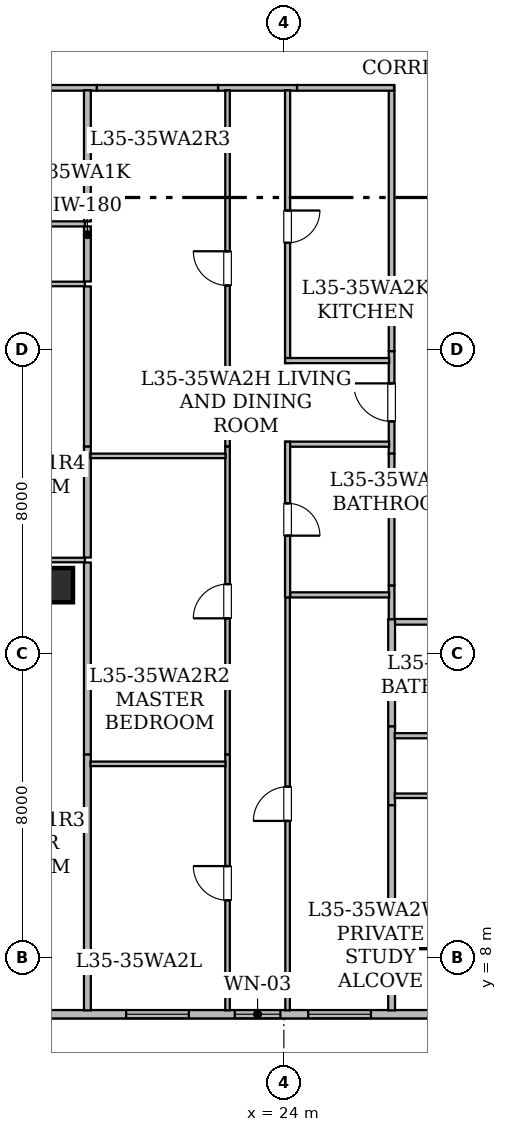
"""IFC4 building model, lengths in metres.
Left out: names, types, materials, properties, quantities, classifications, styles, units other than length and angle.
Written with IfcOpenShell. Run it as: python <this file> out.ifc"""

import sys

from ifc_helpers import new_model, si_unit, direction, frame, frame_2d, origin, origin_2d, place, context, subcontext, project, spatial, rectangle, hollow_rectangle, extrude, element, fill, save


model = new_model("IFC4")
c1 = context("Model", 3, precision=1e-05, world=origin(), true_north=direction((0.0, 1.0)))
c2 = subcontext(c1, "Body", "Model", "MODEL_VIEW")
j1 = project(units=[si_unit("LENGTHUNIT", "METRE"), si_unit("PLANEANGLEUNIT", "RADIAN")], contexts=[c1])
p1 = place(None, origin())
s1 = spatial("IfcSite", under=j1, at=p1, CompositionType="ELEMENT")
p2 = place(p1, origin())
s2 = spatial("IfcBuilding", under=s1, at=p2, CompositionType="ELEMENT")
p3 = place(p2, frame((0.0, 0.0, 138.4)))
s3 = spatial("IfcBuildingStorey", under=s2, at=p3, CompositionType="ELEMENT", Elevation=138.4)
for number, where, z_axis, x_axis in (
    (1, (27.35, 8.7, 0.0), (0.0, 0.0, 1.0), (1.0, 0.0, 0.0)),
    (2, (18.0, 17.8, 0.0), (0.0, 0.0, 1.0), (1.0, 0.0, 0.0)),
):
    element("IfcColumn", number, at=place(p3, frame(where, z_axis=z_axis, x_axis=x_axis)), inside=s3, PredefinedType="COLUMN", context=c2, shape_type="SweptSolid", body=[
        extrude(hollow_rectangle(XDim=0.9, YDim=0.9, WallThickness=0.045, at=origin_2d()), origin(), (0.0, 0.0, 1.0), 3.65),
    ])
p4 = place(p3, frame((52.283, 6.51, 0.0), z_axis=(0.0, 0.0, 1.0), x_axis=(-1.0, 0.0, 0.0)))
e3 = element("IfcWall", 3, at=p4, inside=s3, PredefinedType="STANDARD", context=c2, shape_type="SweptSolid", body=[
    extrude(rectangle(XDim=38.568, YDim=0.22, at=frame_2d((19.284, 0.0))), origin(), (0.0, 0.0, 1.0), 3.43),
])
p5 = place(p4, frame((34.581, 0.0, 0.85)))
e4 = element("IfcOpeningElement", 4, at=p5, cuts=e3, PredefinedType="OPENING", context=c2, shape_type="SweptSolid", body=[
    extrude(rectangle(XDim=1.65, YDim=1.55, at=frame_2d((0.825, 0.775))), frame((0.0, 0.12, 0.0), z_axis=(0.0, -1.0, 0.0), x_axis=(1.0, 0.0, 0.0)), (0.0, 0.0, 1.0), 0.24),
])
p6 = place(p4, frame((25.992, 0.0, 0.85)))
e5 = element("IfcOpeningElement", 5, at=p6, cuts=e3, PredefinedType="OPENING", context=c2, shape_type="SweptSolid", body=[
    extrude(rectangle(XDim=1.65, YDim=1.55, at=frame_2d((0.825, 0.775))), frame((0.0, 0.12, 0.0), z_axis=(0.0, -1.0, 0.0), x_axis=(1.0, 0.0, 0.0)), (0.0, 0.0, 1.0), 0.24),
])
p7 = place(p4, frame((28.375, 0.0, 0.8)))
e6 = element("IfcOpeningElement", 6, at=p7, cuts=e3, PredefinedType="OPENING", context=c2, shape_type="SweptSolid", body=[
    extrude(rectangle(XDim=1.2, YDim=1.5, at=frame_2d((0.6, 0.75))), frame((0.0, 0.12, 0.0), z_axis=(0.0, -1.0, 0.0), x_axis=(1.0, 0.0, 0.0)), (0.0, 0.0, 1.0), 0.24),
])
p8 = place(p4, frame((30.784, 0.0, 0.85)))
e7 = element("IfcOpeningElement", 7, at=p8, cuts=e3, PredefinedType="OPENING", context=c2, shape_type="SweptSolid", body=[
    extrude(rectangle(XDim=1.65, YDim=1.55, at=frame_2d((0.825, 0.775))), frame((0.0, 0.12, 0.0), z_axis=(0.0, -1.0, 0.0), x_axis=(1.0, 0.0, 0.0)), (0.0, 0.0, 1.0), 0.24),
])
p9 = place(p4, frame((21.298, 0.0, 0.85)))
e8 = element("IfcOpeningElement", 8, at=p9, cuts=e3, PredefinedType="OPENING", context=c2, shape_type="SweptSolid", body=[
    extrude(rectangle(XDim=1.65, YDim=1.55, at=frame_2d((0.825, 0.775))), frame((0.0, 0.12, 0.0), z_axis=(0.0, -1.0, 0.0), x_axis=(1.0, 0.0, 0.0)), (0.0, 0.0, 1.0), 0.24),
])
p10 = place(p4, frame((14.033, 0.0, 0.85)))
e9 = element("IfcOpeningElement", 9, at=p10, cuts=e3, PredefinedType="OPENING", context=c2, shape_type="SweptSolid", body=[
    extrude(rectangle(XDim=1.65, YDim=1.55, at=frame_2d((0.825, 0.775))), frame((0.0, 0.12, 0.0), z_axis=(0.0, -1.0, 0.0), x_axis=(1.0, 0.0, 0.0)), (0.0, 0.0, 1.0), 0.24),
])
p11 = place(p4, frame((6.688, 0.0, 0.85)))
e10 = element("IfcOpeningElement", 10, at=p11, cuts=e3, PredefinedType="OPENING", context=c2, shape_type="SweptSolid", body=[
    extrude(rectangle(XDim=1.65, YDim=1.55, at=frame_2d((0.825, 0.775))), frame((0.0, 0.12, 0.0), z_axis=(0.0, -1.0, 0.0), x_axis=(1.0, 0.0, 0.0)), (0.0, 0.0, 1.0), 0.24),
])
p12 = place(p4, frame((0.587, 0.0, 0.85)))
e11 = element("IfcOpeningElement", 11, at=p12, cuts=e3, PredefinedType="OPENING", context=c2, shape_type="SweptSolid", body=[
    extrude(rectangle(XDim=1.65, YDim=1.55, at=frame_2d((0.825, 0.775))), frame((0.0, 0.12, 0.0), z_axis=(0.0, -1.0, 0.0), x_axis=(1.0, 0.0, 0.0)), (0.0, 0.0, 1.0), 0.24),
])
p13 = place(p3, frame((19.08, 30.885, 0.0), z_axis=(0.0, 0.0, 1.0), x_axis=(-1.0, 0.0, 0.0)))
e12 = element("IfcWall", 12, at=p13, inside=s3, PredefinedType="STANDARD", context=c2, shape_type="SweptSolid", body=[
    extrude(rectangle(XDim=3.437, YDim=0.15, at=frame_2d((1.719, 0.0))), origin(), (0.0, 0.0, 1.0), 2.647),
])
p14 = place(p3, frame((26.835, 16.9, 0.0), z_axis=(0.0, 0.0, 1.0), x_axis=(0.0, 1.0, 0.0)))
e13 = element("IfcWall", 13, at=p14, inside=s3, PredefinedType="STANDARD", context=c2, shape_type="SweptSolid", body=[
    extrude(rectangle(XDim=0.893, YDim=0.15, at=frame_2d((0.447, 0.0))), origin(), (0.0, 0.0, 1.0), 3.43),
])
p15 = place(p3, frame((26.835, 21.26, 0.0), z_axis=(0.0, 0.0, 1.0), x_axis=(0.0, 1.0, 0.0)))
e14 = element("IfcWall", 14, at=p15, inside=s3, PredefinedType="STANDARD", context=c2, shape_type="SweptSolid", body=[
    extrude(rectangle(XDim=2.698, YDim=0.15, at=frame_2d((1.349, 0.0))), origin(), (0.0, 0.0, 1.0), 3.43),
])
p16 = place(p15, frame((0.849, 0.0, 0.0)))
e15 = element("IfcOpeningElement", 15, at=p16, cuts=e14, PredefinedType="OPENING", context=c2, shape_type="SweptSolid", body=[
    extrude(rectangle(XDim=1.0, YDim=2.15, at=frame_2d((0.5, 1.075))), frame((0.0, 0.085, 0.0), z_axis=(0.0, -1.0, 0.0), x_axis=(1.0, 0.0, 0.0)), (0.0, 0.0, 1.0), 0.17),
])
p17 = place(p3, frame((24.347, 30.885, 0.0), z_axis=(0.0, 0.0, 1.0), x_axis=(-1.0, 0.0, 0.0)))
e16 = element("IfcWall", 16, at=p17, inside=s3, PredefinedType="STANDARD", context=c2, shape_type="SweptSolid", body=[
    extrude(rectangle(XDim=2.079, YDim=0.15, at=frame_2d((1.04, 0.0))), origin(), (0.0, 0.0, 1.0), 3.43),
])
p18 = place(p3, frame((26.835, 17.793, 0.0), z_axis=(0.0, 0.0, 1.0), x_axis=(0.0, 1.0, 0.0)))
e17 = element("IfcWall", 17, at=p18, inside=s3, PredefinedType="STANDARD", context=c2, shape_type="SweptSolid", body=[
    extrude(rectangle(XDim=3.467, YDim=0.15, at=frame_2d((1.733, 0.0))), origin(), (0.0, 0.0, 1.0), 2.647),
])
p19 = place(p3, frame((26.835, 23.958, 0.0), z_axis=(0.0, 0.0, 1.0), x_axis=(0.0, 1.0, 0.0)))
e18 = element("IfcWall", 18, at=p19, inside=s3, PredefinedType="STANDARD", context=c2, shape_type="SweptSolid", body=[
    extrude(rectangle(XDim=6.992, YDim=0.15, at=frame_2d((3.496, 0.0))), origin(), (0.0, 0.0, 1.0), 3.013),
])
p20 = place(p3, frame((26.898, 30.885, 0.0), z_axis=(0.0, 0.0, 1.0), x_axis=(-1.0, 0.0, 0.0)))
e19 = element("IfcWall", 19, at=p20, inside=s3, PredefinedType="STANDARD", context=c2, shape_type="SweptSolid", body=[
    extrude(rectangle(XDim=2.551, YDim=0.15, at=frame_2d((1.275, 0.0))), origin(), (0.0, 0.0, 1.0), 3.43),
])
p21 = place(p3, frame((22.268, 30.885, 0.0), z_axis=(0.0, 0.0, 1.0), x_axis=(-1.0, 0.0, 0.0)))
e20 = element("IfcWall", 20, at=p21, inside=s3, PredefinedType="STANDARD", context=c2, shape_type="SweptSolid", body=[
    extrude(rectangle(XDim=3.188, YDim=0.15, at=frame_2d((1.594, 0.0))), origin(), (0.0, 0.0, 1.0), 3.43),
])
p22 = place(p3, frame((31.601, 16.835, 0.0), z_axis=(0.0, 0.0, 1.0), x_axis=(-1.0, 0.0, 0.0)))
e21 = element("IfcWall", 21, at=p22, inside=s3, PredefinedType="STANDARD", context=c2, shape_type="SweptSolid", body=[
    extrude(rectangle(XDim=4.701, YDim=0.15, at=frame_2d((2.351, 0.0))), origin(), (0.0, 0.0, 1.0), 2.647),
])
p23 = place(p3, frame((15.859, 27.305, 0.0), z_axis=(0.0, 0.0, 1.0), x_axis=(1.0, 0.0, 0.0)))
e22 = element("IfcWall", 22, at=p23, inside=s3, PredefinedType="PARTITIONING", context=c2, shape_type="SweptSolid", body=[
    extrude(rectangle(XDim=2.906, YDim=0.135, at=frame_2d((1.453, 0.0))), origin(), (0.0, 0.0, 1.0), 2.647),
])
p24 = place(p3, frame((18.765, 25.725, 0.0), z_axis=(0.0, 0.0, 1.0), x_axis=(-1.0, 0.0, 0.0)))
e23 = element("IfcWall", 23, at=p24, inside=s3, PredefinedType="PARTITIONING", context=c2, shape_type="SweptSolid", body=[
    extrude(rectangle(XDim=3.907, YDim=0.12, at=frame_2d((1.954, 0.0))), origin(), (0.0, 0.0, 1.0), 2.647),
])
p25 = place(p3, frame((18.83, 27.24, 0.0), z_axis=(0.0, 0.0, 1.0), x_axis=(0.0, -1.0, 0.0)))
e24 = element("IfcWall", 24, at=p25, inside=s3, PredefinedType="STANDARD", context=c2, shape_type="SweptSolid", body=[
    extrude(rectangle(XDim=1.45, YDim=0.18, at=frame_2d((0.725, 0.0))), origin(), (0.0, 0.0, 1.0), 3.43),
])
p26 = place(p3, frame((18.83, 30.82, 0.0), z_axis=(0.0, 0.0, 1.0), x_axis=(0.0, -1.0, 0.0)))
e25 = element("IfcWall", 25, at=p26, inside=s3, PredefinedType="STANDARD", context=c2, shape_type="SweptSolid", body=[
    extrude(rectangle(XDim=3.45, YDim=0.18, at=frame_2d((1.725, 0.0))), origin(), (0.0, 0.0, 1.0), 3.013),
])
p27 = place(p3, frame((14.977, 18.461, 0.0), z_axis=(0.0, 0.0, 1.0), x_axis=(1.0, 0.0, 0.0)))
e26 = element("IfcWall", 26, at=p27, inside=s3, PredefinedType="PARTITIONING", context=c2, shape_type="SweptSolid", body=[
    extrude(rectangle(XDim=3.788, YDim=0.12, at=frame_2d((1.894, 0.0))), origin(), (0.0, 0.0, 1.0), 2.647),
])
p28 = place(p3, frame((18.83, 13.347, 0.0), z_axis=(0.0, 0.0, 1.0), x_axis=(0.0, -1.0, 0.0)))
e27 = element("IfcWall", 27, at=p28, inside=s3, PredefinedType="STANDARD", context=c2, shape_type="SweptSolid", body=[
    extrude(rectangle(XDim=6.735, YDim=0.18, at=frame_2d((3.367, 0.0))), origin(), (0.0, 0.0, 1.0), 2.876),
])
p29 = place(p3, frame((18.83, 18.396, 0.0), z_axis=(0.0, 0.0, 1.0), x_axis=(0.0, -1.0, 0.0)))
e28 = element("IfcWall", 28, at=p29, inside=s3, PredefinedType="STANDARD", context=c2, shape_type="SweptSolid", body=[
    extrude(rectangle(XDim=5.049, YDim=0.18, at=frame_2d((2.524, 0.0))), origin(), (0.0, 0.0, 1.0), 2.647),
])
p30 = place(p3, frame((18.83, 21.451, 0.0), z_axis=(0.0, 0.0, 1.0), x_axis=(0.0, -1.0, 0.0)))
e29 = element("IfcWall", 29, at=p30, inside=s3, PredefinedType="STANDARD", context=c2, shape_type="SweptSolid", body=[
    extrude(rectangle(XDim=2.925, YDim=0.18, at=frame_2d((1.462, 0.0))), origin(), (0.0, 0.0, 1.0), 3.43),
])
p31 = place(p3, frame((18.83, 25.66, 0.0), z_axis=(0.0, 0.0, 1.0), x_axis=(0.0, -1.0, 0.0)))
e30 = element("IfcWall", 30, at=p31, inside=s3, PredefinedType="STANDARD", context=c2, shape_type="SweptSolid", body=[
    extrude(rectangle(XDim=4.209, YDim=0.18, at=frame_2d((2.104, 0.0))), origin(), (0.0, 0.0, 1.0), 3.43),
])
p32 = place(p3, frame((24.098, 6.612, 0.0), z_axis=(0.0, 0.0, 1.0), x_axis=(0.0, 1.0, 0.0)))
e31 = element("IfcWall", 31, at=p32, inside=s3, PredefinedType="PARTITIONING", context=c2, shape_type="SweptSolid", body=[
    extrude(rectangle(XDim=10.867, YDim=0.12, at=frame_2d((5.434, 0.0))), origin(), (0.0, 0.0, 1.0), 2.876),
])
p33 = place(p32, frame((4.984, 0.0, 0.0)))
e32 = element("IfcOpeningElement", 32, at=p33, cuts=e31, PredefinedType="OPENING", context=c2, shape_type="SweptSolid", body=[
    extrude(rectangle(XDim=0.9, YDim=2.1, at=frame_2d((0.45, 1.05))), frame((0.0, 0.07, 0.0), z_axis=(0.0, -1.0, 0.0), x_axis=(1.0, 0.0, 0.0)), (0.0, 0.0, 1.0), 0.14),
])
p34 = place(p3, frame((24.163, 17.544, 0.0), z_axis=(0.0, 0.0, 1.0), x_axis=(1.0, 0.0, 0.0)))
e33 = element("IfcWall", 33, at=p34, inside=s3, PredefinedType="PARTITIONING", context=c2, shape_type="SweptSolid", body=[
    extrude(rectangle(XDim=2.607, YDim=0.135, at=frame_2d((1.303, 0.0))), origin(), (0.0, 0.0, 1.0), 3.43),
])
p35 = place(p3, frame((26.835, 14.087, 0.0), z_axis=(0.0, 0.0, 1.0), x_axis=(0.0, -1.0, 0.0)))
e34 = element("IfcWall", 34, at=p35, inside=s3, PredefinedType="STANDARD", context=c2, shape_type="SweptSolid", body=[
    extrude(rectangle(XDim=2.078, YDim=0.18, at=frame_2d((1.039, 0.0))), origin(), (0.0, 0.0, 1.0), 3.43),
])
p36 = place(p3, frame((26.835, 16.9, 0.0), z_axis=(0.0, 0.0, 1.0), x_axis=(0.0, -1.0, 0.0)))
e35 = element("IfcWall", 35, at=p36, inside=s3, PredefinedType="STANDARD", context=c2, shape_type="SweptSolid", body=[
    extrude(rectangle(XDim=2.813, YDim=0.18, at=frame_2d((1.406, 0.0))), origin(), (0.0, 0.0, 1.0), 3.43),
])
p37 = place(p3, frame((26.835, 12.009, 0.0), z_axis=(0.0, 0.0, 1.0), x_axis=(0.0, -1.0, 0.0)))
e36 = element("IfcWall", 36, at=p37, inside=s3, PredefinedType="STANDARD", context=c2, shape_type="SweptSolid", body=[
    extrude(rectangle(XDim=5.397, YDim=0.18, at=frame_2d((2.698, 0.0))), origin(), (0.0, 0.0, 1.0), 2.876),
])
p38 = place(p3, frame((26.77, 21.509, 0.0), z_axis=(0.0, 0.0, 1.0), x_axis=(-1.0, 0.0, 0.0)))
e37 = element("IfcWall", 37, at=p38, inside=s3, PredefinedType="PARTITIONING", context=c2, shape_type="SweptSolid", body=[
    extrude(rectangle(XDim=2.737, YDim=0.135, at=frame_2d((1.369, 0.0))), origin(), (0.0, 0.0, 1.0), 3.43),
])
p39 = place(p3, frame((24.098, 21.574, 0.0), z_axis=(0.0, 0.0, 1.0), x_axis=(0.0, -1.0, 0.0)))
e38 = element("IfcWall", 38, at=p39, inside=s3, PredefinedType="PARTITIONING", context=c2, shape_type="SweptSolid", body=[
    extrude(rectangle(XDim=4.095, YDim=0.135, at=frame_2d((2.047, 0.0))), origin(), (0.0, 0.0, 1.0), 2.647),
])
p40 = place(p39, frame((1.622, 0.0, 0.0)))
e39 = element("IfcOpeningElement", 39, at=p40, cuts=e38, PredefinedType="OPENING", context=c2, shape_type="SweptSolid", body=[
    extrude(rectangle(XDim=0.85, YDim=2.1, at=frame_2d((0.425, 1.05))), frame((0.0, 0.077, 0.0), z_axis=(0.0, -1.0, 0.0), x_axis=(1.0, 0.0, 0.0)), (0.0, 0.0, 1.0), 0.155),
])
p41 = place(p3, frame((24.098, 30.82, 0.0), z_axis=(0.0, 0.0, 1.0), x_axis=(0.0, -1.0, 0.0)))
e40 = element("IfcWall", 40, at=p41, inside=s3, PredefinedType="PARTITIONING", context=c2, shape_type="SweptSolid", body=[
    extrude(rectangle(XDim=7.176, YDim=0.135, at=frame_2d((3.588, 0.0))), origin(), (0.0, 0.0, 1.0), 3.013),
])
p42 = place(p41, frame((3.163, 0.0, 0.0)))
e41 = element("IfcOpeningElement", 41, at=p42, cuts=e40, PredefinedType="OPENING", context=c2, shape_type="SweptSolid", body=[
    extrude(rectangle(XDim=0.85, YDim=2.1, at=frame_2d((0.425, 1.05))), frame((0.0, 0.077, 0.0), z_axis=(0.0, -1.0, 0.0), x_axis=(1.0, 0.0, 0.0)), (0.0, 0.0, 1.0), 0.155),
])
p43 = place(p3, frame((24.033, 23.709, 0.0), z_axis=(0.0, 0.0, 1.0), x_axis=(1.0, 0.0, 0.0)))
e42 = element("IfcWall", 42, at=p43, inside=s3, PredefinedType="PARTITIONING", context=c2, shape_type="SweptSolid", body=[
    extrude(rectangle(XDim=2.737, YDim=0.135, at=frame_2d((1.369, 0.0))), origin(), (0.0, 0.0, 1.0), 3.43),
])
p44 = place(p3, frame((22.518, 6.612, 0.0), z_axis=(0.0, 0.0, 1.0), x_axis=(0.0, 1.0, 0.0)))
e43 = element("IfcWall", 43, at=p44, inside=s3, PredefinedType="PARTITIONING", context=c2, shape_type="SweptSolid", body=[
    extrude(rectangle(XDim=6.735, YDim=0.12, at=frame_2d((3.367, 0.0))), origin(), (0.0, 0.0, 1.0), 2.876),
])
p45 = place(p44, frame((2.896, 0.0, 0.0)))
e44 = element("IfcOpeningElement", 44, at=p45, cuts=e43, PredefinedType="OPENING", context=c2, shape_type="SweptSolid", body=[
    extrude(rectangle(XDim=0.9, YDim=2.1, at=frame_2d((0.45, 1.05))), frame((0.0, 0.07, 0.0), z_axis=(0.0, -1.0, 0.0), x_axis=(1.0, 0.0, 0.0)), (0.0, 0.0, 1.0), 0.14),
])
p46 = place(p3, frame((22.518, 13.347, 0.0), z_axis=(0.0, 0.0, 1.0), x_axis=(0.0, 1.0, 0.0)))
e45 = element("IfcWall", 45, at=p46, inside=s3, PredefinedType="PARTITIONING", context=c2, shape_type="SweptSolid", body=[
    extrude(rectangle(XDim=8.104, YDim=0.12, at=frame_2d((4.052, 0.0))), origin(), (0.0, 0.0, 1.0), 2.647),
])
p47 = place(p46, frame((3.58, 0.0, 0.0)))
e46 = element("IfcOpeningElement", 46, at=p47, cuts=e45, PredefinedType="OPENING", context=c2, shape_type="SweptSolid", body=[
    extrude(rectangle(XDim=0.9, YDim=2.1, at=frame_2d((0.45, 1.05))), frame((0.0, 0.07, 0.0), z_axis=(0.0, -1.0, 0.0), x_axis=(1.0, 0.0, 0.0)), (0.0, 0.0, 1.0), 0.14),
])
p48 = place(p3, frame((22.518, 21.451, 0.0), z_axis=(0.0, 0.0, 1.0), x_axis=(0.0, 1.0, 0.0)))
e47 = element("IfcWall", 47, at=p48, inside=s3, PredefinedType="PARTITIONING", context=c2, shape_type="SweptSolid", body=[
    extrude(rectangle(XDim=9.369, YDim=0.12, at=frame_2d((4.685, 0.0))), origin(), (0.0, 0.0, 1.0), 3.013),
])
p49 = place(p48, frame((4.234, 0.0, 0.0)))
e48 = element("IfcOpeningElement", 48, at=p49, cuts=e47, PredefinedType="OPENING", context=c2, shape_type="SweptSolid", body=[
    extrude(rectangle(XDim=0.9, YDim=2.1, at=frame_2d((0.45, 1.05))), frame((0.0, 0.07, 0.0), z_axis=(0.0, -1.0, 0.0), x_axis=(1.0, 0.0, 0.0)), (0.0, 0.0, 1.0), 0.14),
])
for number, where, z_axis, x_axis in (
    (49, (18.912, 13.098, 0.0), (0.0, 0.0, 1.0), (1.0, 0.0, 0.0)),
    (50, (18.912, 21.201, 0.0), (0.0, 0.0, 1.0), (1.0, 0.0, 0.0)),
):
    element("IfcWall", number, at=place(p3, frame(where, z_axis=z_axis, x_axis=x_axis)), inside=s3, PredefinedType="PARTITIONING", context=c2, shape_type="SweptSolid", body=[
        extrude(rectangle(XDim=3.552, YDim=0.12, at=frame_2d((1.776, 0.0))), origin(), (0.0, 0.0, 1.0), 3.43),
    ])
p50 = place(p3, frame((26.917, 13.838, 0.0), z_axis=(0.0, 0.0, 1.0), x_axis=(1.0, 0.0, 0.0)))
e51 = element("IfcWall", 51, at=p50, inside=s3, PredefinedType="PARTITIONING", context=c2, shape_type="SweptSolid", body=[
    extrude(rectangle(XDim=4.998, YDim=0.135, at=frame_2d((2.499, 0.0))), origin(), (0.0, 0.0, 1.0), 2.647),
])
p51 = place(p50, frame((2.074, 0.0, 0.0)))
e52 = element("IfcOpeningElement", 52, at=p51, cuts=e51, PredefinedType="OPENING", context=c2, shape_type="SweptSolid", body=[
    extrude(rectangle(XDim=0.85, YDim=2.1, at=frame_2d((0.425, 1.05))), frame((0.0, 0.077, 0.0), z_axis=(0.0, -1.0, 0.0), x_axis=(1.0, 0.0, 0.0)), (0.0, 0.0, 1.0), 0.155),
])
p52 = place(p3, frame((33.734, 12.258, 0.0), z_axis=(0.0, 0.0, 1.0), x_axis=(-1.0, 0.0, 0.0)))
e53 = element("IfcWall", 53, at=p52, inside=s3, PredefinedType="PARTITIONING", context=c2, shape_type="SweptSolid", body=[
    extrude(rectangle(XDim=6.817, YDim=0.12, at=frame_2d((3.408, 0.0))), origin(), (0.0, 0.0, 1.0), 2.647),
])
p53 = place(p52, frame((2.98, 0.0, 0.0)))
e54 = element("IfcOpeningElement", 54, at=p53, cuts=e53, PredefinedType="OPENING", context=c2, shape_type="SweptSolid", body=[
    extrude(rectangle(XDim=0.9, YDim=2.1, at=frame_2d((0.45, 1.05))), frame((0.0, 0.07, 0.0), z_axis=(0.0, -1.0, 0.0), x_axis=(1.0, 0.0, 0.0)), (0.0, 0.0, 1.0), 0.14),
])
p54 = place(p6, origin())
e55 = element("IfcWindow", 55, at=p54, inside=s3, PartitioningType="SINGLE_PANEL", PredefinedType="WINDOW", context=c2, shape_type="SweptSolid", body=[
    extrude(rectangle(XDim=1.65, YDim=1.55, at=frame_2d((0.825, 0.775))), frame((0.0, 0.03, 0.0), z_axis=(0.0, -1.0, 0.0), x_axis=(1.0, 0.0, 0.0)), (0.0, 0.0, 1.0), 0.06),
])
fill(e5, e55)
p55 = place(p7, origin())
e56 = element("IfcWindow", 56, at=p55, inside=s3, PartitioningType="SINGLE_PANEL", PredefinedType="WINDOW", context=c2, shape_type="SweptSolid", body=[
    extrude(rectangle(XDim=1.2, YDim=1.5, at=frame_2d((0.6, 0.75))), frame((0.0, 0.03, 0.0), z_axis=(0.0, -1.0, 0.0), x_axis=(1.0, 0.0, 0.0)), (0.0, 0.0, 1.0), 0.06),
])
fill(e6, e56)
p56 = place(p8, origin())
e57 = element("IfcWindow", 57, at=p56, inside=s3, PartitioningType="SINGLE_PANEL", PredefinedType="WINDOW", context=c2, shape_type="SweptSolid", body=[
    extrude(rectangle(XDim=1.65, YDim=1.55, at=frame_2d((0.825, 0.775))), frame((0.0, 0.03, 0.0), z_axis=(0.0, -1.0, 0.0), x_axis=(1.0, 0.0, 0.0)), (0.0, 0.0, 1.0), 0.06),
])
fill(e7, e57)
p57 = place(p16, origin())
e58 = element("IfcDoor", 58, at=p57, inside=s3, OperationType="SINGLE_SWING_RIGHT", PredefinedType="DOOR", context=c2, shape_type="SweptSolid", body=[
    extrude(rectangle(XDim=1.0, YDim=2.15, at=frame_2d((0.5, 1.075))), frame((0.0, 0.025, 0.0), z_axis=(0.0, -1.0, 0.0), x_axis=(1.0, 0.0, 0.0)), (0.0, 0.0, 1.0), 0.05),
])
fill(e15, e58)
p58 = place(p33, origin())
e59 = element("IfcDoor", 59, at=p58, inside=s3, OperationType="SINGLE_SWING_LEFT", PredefinedType="DOOR", context=c2, shape_type="SweptSolid", body=[
    extrude(rectangle(XDim=0.9, YDim=2.1, at=frame_2d((0.45, 1.05))), frame((0.0, 0.025, 0.0), z_axis=(0.0, -1.0, 0.0), x_axis=(1.0, 0.0, 0.0)), (0.0, 0.0, 1.0), 0.05),
])
fill(e32, e59)
p59 = place(p40, origin())
e60 = element("IfcDoor", 60, at=p59, inside=s3, OperationType="SINGLE_SWING_RIGHT", PredefinedType="DOOR", context=c2, shape_type="SweptSolid", body=[
    extrude(rectangle(XDim=0.85, YDim=2.1, at=frame_2d((0.425, 1.05))), frame((0.0, 0.025, 0.0), z_axis=(0.0, -1.0, 0.0), x_axis=(1.0, 0.0, 0.0)), (0.0, 0.0, 1.0), 0.05),
])
fill(e39, e60)
p60 = place(p42, origin())
e61 = element("IfcDoor", 61, at=p60, inside=s3, OperationType="SINGLE_SWING_LEFT", PredefinedType="DOOR", context=c2, shape_type="SweptSolid", body=[
    extrude(rectangle(XDim=0.85, YDim=2.1, at=frame_2d((0.425, 1.05))), frame((0.0, 0.025, 0.0), z_axis=(0.0, -1.0, 0.0), x_axis=(1.0, 0.0, 0.0)), (0.0, 0.0, 1.0), 0.05),
])
fill(e41, e61)
p61 = place(p45, origin())
e62 = element("IfcDoor", 62, at=p61, inside=s3, OperationType="SINGLE_SWING_RIGHT", PredefinedType="DOOR", context=c2, shape_type="SweptSolid", body=[
    extrude(rectangle(XDim=0.9, YDim=2.1, at=frame_2d((0.45, 1.05))), frame((0.0, 0.025, 0.0), z_axis=(0.0, -1.0, 0.0), x_axis=(1.0, 0.0, 0.0)), (0.0, 0.0, 1.0), 0.05),
])
fill(e44, e62)
p62 = place(p47, origin())
e63 = element("IfcDoor", 63, at=p62, inside=s3, OperationType="SINGLE_SWING_LEFT", PredefinedType="DOOR", context=c2, shape_type="SweptSolid", body=[
    extrude(rectangle(XDim=0.9, YDim=2.1, at=frame_2d((0.45, 1.05))), frame((0.0, 0.025, 0.0), z_axis=(0.0, -1.0, 0.0), x_axis=(1.0, 0.0, 0.0)), (0.0, 0.0, 1.0), 0.05),
])
fill(e46, e63)
p63 = place(p49, origin())
e64 = element("IfcDoor", 64, at=p63, inside=s3, OperationType="SINGLE_SWING_RIGHT", PredefinedType="DOOR", context=c2, shape_type="SweptSolid", body=[
    extrude(rectangle(XDim=0.9, YDim=2.1, at=frame_2d((0.45, 1.05))), frame((0.0, 0.025, 0.0), z_axis=(0.0, -1.0, 0.0), x_axis=(1.0, 0.0, 0.0)), (0.0, 0.0, 1.0), 0.05),
])
fill(e48, e64)
save(model, sys.argv[1])
